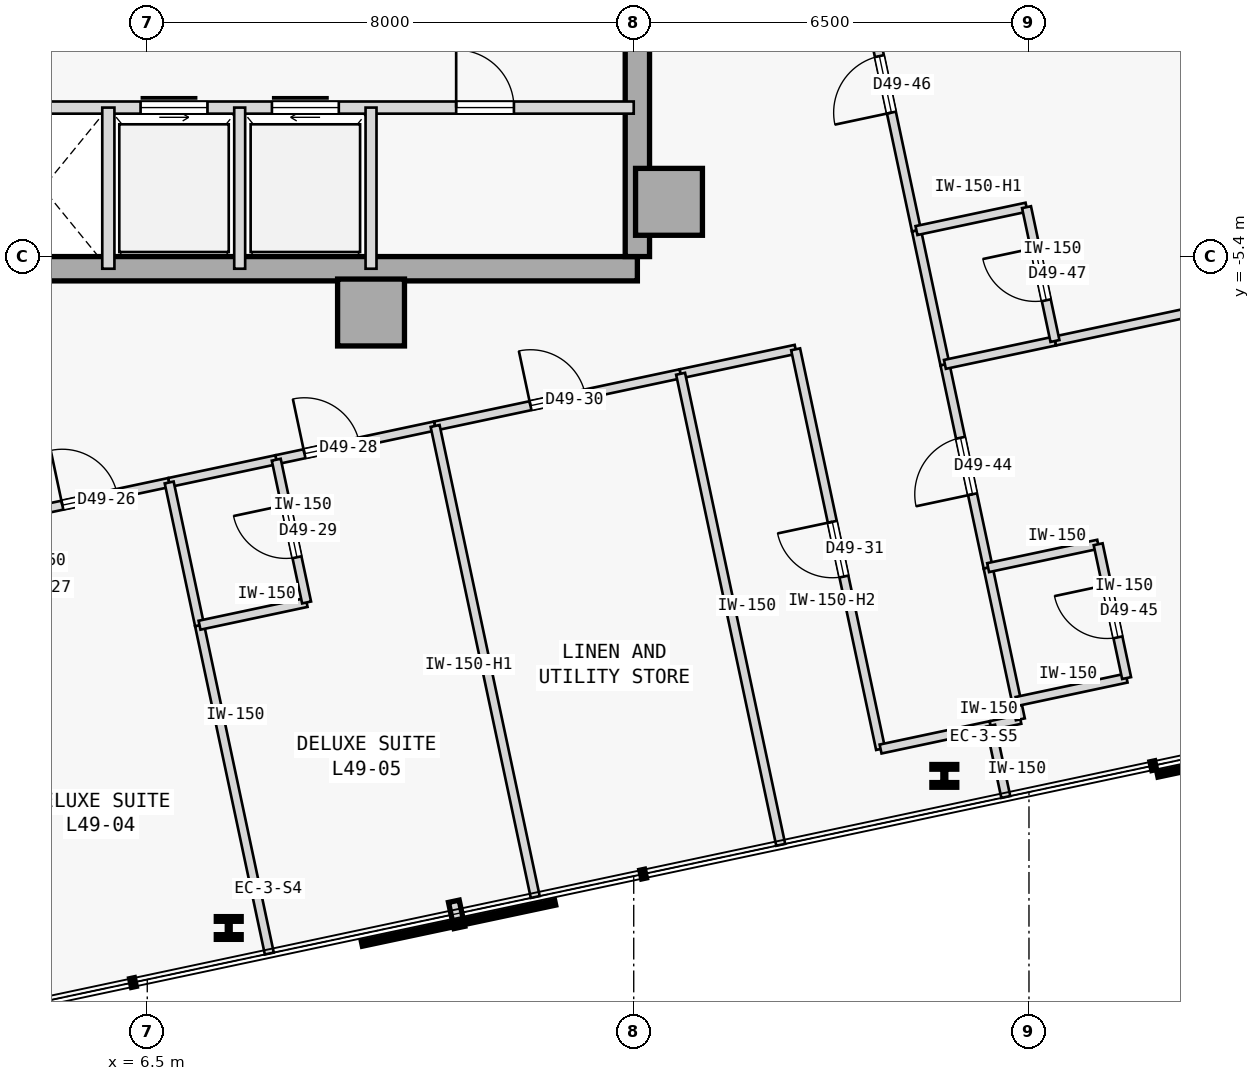
"""IFC4 building model, lengths in metres.
Left out: names, types, materials, properties, quantities, classifications, styles, units other than length and angle.
Written with IfcOpenShell. Run it as: python <this file> out.ifc"""

import sys

from ifc_helpers import new_model, si_unit, direction, frame, frame_2d, origin, origin_2d, place, context, subcontext, project, spatial, rectangle, i_section, extrude, element, fill, save


model = new_model("IFC4")
c1 = context("Model", 3, precision=1e-05, world=origin(), true_north=direction((0.0, 1.0)))
c2 = subcontext(c1, "Body", "Model", "MODEL_VIEW")
j1 = project(units=[si_unit("LENGTHUNIT", "METRE"), si_unit("PLANEANGLEUNIT", "RADIAN")], contexts=[c1])
p1 = place(None, origin())
s1 = spatial("IfcSite", under=j1, at=p1, CompositionType="ELEMENT")
p2 = place(p1, origin())
s2 = spatial("IfcBuilding", under=s1, at=p2, CompositionType="ELEMENT")
p3 = place(p2, frame((0.0, 0.0, 188.8)))
s3 = spatial("IfcBuildingStorey", under=s2, at=p3, CompositionType="ELEMENT", Elevation=188.8)
for number, where, z_axis, x_axis in (
    (1, (15.08, -4.5, 0.0), (0.0, 0.0, 1.0), (1.0, 0.0, 0.0)),
    (2, (10.18, -6.32, 0.0), (0.0, 0.0, 1.0), (1.0, 0.0, 0.0)),
):
    element("IfcColumn", number, at=place(p3, frame(where, z_axis=z_axis, x_axis=x_axis)), inside=s3, PredefinedType="COLUMN", context=c2, shape_type="SweptSolid", body=[
        extrude(rectangle(XDim=1.1, YDim=1.1, at=origin_2d()), origin(), (0.0, 0.0, 1.0), 3.4),
    ])
p4 = place(p3, frame((3.7, -5.6, 0.0), z_axis=(0.0, 0.0, 1.0), x_axis=(1.0, 0.0, 0.0)))
e3 = element("IfcWall", 3, at=p4, inside=s3, PredefinedType="SHEAR", context=c2, shape_type="SweptSolid", body=[
    extrude(rectangle(XDim=10.86, YDim=0.4, at=frame_2d((5.43, 0.0))), origin(), (0.0, 0.0, 1.0), 3.175),
])
p5 = place(p3, frame((14.56, -5.4, 0.0), z_axis=(0.0, 0.0, 1.0), x_axis=(0.0, 1.0, 0.0)))
e4 = element("IfcWall", 4, at=p5, inside=s3, PredefinedType="SHEAR", context=c2, shape_type="SweptSolid", body=[
    extrude(rectangle(XDim=10.8, YDim=0.4, at=frame_2d((5.4, 0.0))), origin(), (0.0, 0.0, 1.0), 3.175),
])
for number, where, z_axis, x_axis in (
    (5, (7.84, -16.441, 0.0), (0.0, 0.0, 1.0), (1.0, 0.0, 0.0)),
    (6, (19.608, -13.94, 0.0), (0.0, 0.0, 1.0), (1.0, 0.0, 0.0)),
):
    element("IfcColumn", number, at=place(p3, frame(where, z_axis=z_axis, x_axis=x_axis)), inside=s3, PredefinedType="COLUMN", context=c2, shape_type="SweptSolid", body=[
        extrude(i_section(OverallWidth=0.409, OverallDepth=0.374, WebThickness=0.048, FlangeThickness=0.077, FilletRadius=0.015, at=origin_2d()), origin(), (0.0, 0.0, 1.0), 3.4),
    ])
p6 = place(p3, frame((3.7, -2.95, 0.0), z_axis=(0.0, 0.0, 1.0), x_axis=(1.0, 0.0, 0.0)))
e7 = element("IfcWall", 7, at=p6, inside=s3, PredefinedType="STANDARD", context=c2, shape_type="SweptSolid", body=[
    extrude(rectangle(XDim=10.8, YDim=0.2, at=frame_2d((5.4, 0.0))), origin(), (0.0, 0.0, 1.0), 3.175),
])
p7 = place(p6, frame((2.69, 0.0, 0.0)))
e8 = element("IfcOpeningElement", 8, at=p7, cuts=e7, PredefinedType="OPENING", context=c2, shape_type="SweptSolid", body=[
    extrude(rectangle(XDim=1.1, YDim=2.15, at=frame_2d((0.55, 1.075))), frame((0.0, 0.11, 0.0), z_axis=(0.0, -1.0, 0.0), x_axis=(1.0, 0.0, 0.0)), (0.0, 0.0, 1.0), 0.22),
])
p8 = place(p6, frame((4.85, 0.0, 0.0)))
e9 = element("IfcOpeningElement", 9, at=p8, cuts=e7, PredefinedType="OPENING", context=c2, shape_type="SweptSolid", body=[
    extrude(rectangle(XDim=1.1, YDim=2.15, at=frame_2d((0.55, 1.075))), frame((0.0, 0.11, 0.0), z_axis=(0.0, -1.0, 0.0), x_axis=(1.0, 0.0, 0.0)), (0.0, 0.0, 1.0), 0.22),
])
p9 = place(p6, frame((7.88, 0.0, 0.0)))
e10 = element("IfcOpeningElement", 10, at=p9, cuts=e7, PredefinedType="OPENING", context=c2, shape_type="SweptSolid", body=[
    extrude(rectangle(XDim=0.95, YDim=2.15, at=frame_2d((0.475, 1.075))), frame((0.0, 0.11, 0.0), z_axis=(0.0, -1.0, 0.0), x_axis=(1.0, 0.0, 0.0)), (0.0, 0.0, 1.0), 0.22),
])
p10 = place(p3, frame((5.86, -5.6, 0.0), z_axis=(0.0, 0.0, 1.0), x_axis=(0.0, 1.0, 0.0)))
e11 = element("IfcWall", 11, at=p10, inside=s3, PredefinedType="STANDARD", context=c2, shape_type="SweptSolid", body=[
    extrude(rectangle(XDim=2.65, YDim=0.2, at=frame_2d((1.325, 0.0))), origin(), (0.0, 0.0, 1.0), 3.175),
])
for number, where, z_axis, x_axis in (
    (12, (10.18, -5.6, 0.0), (0.0, 0.0, 1.0), (0.0, 1.0, 0.0)),
    (13, (8.02, -5.6, 0.0), (0.0, 0.0, 1.0), (0.0, 1.0, 0.0)),
):
    element("IfcWall", number, at=place(p3, frame(where, z_axis=z_axis, x_axis=x_axis)), inside=s3, PredefinedType="STANDARD", context=c2, shape_type="SweptSolid", body=[
        extrude(rectangle(XDim=2.65, YDim=0.18, at=frame_2d((1.325, 0.0))), origin(), (0.0, 0.0, 1.0), 3.175),
    ])
p11 = place(p3, frame((4.247, -9.67, 0.0), z_axis=(0.0, 0.0, 1.0), x_axis=(0.978155367406, 0.207875148141, 0.0)))
e14 = element("IfcWall", 14, at=p11, inside=s3, PredefinedType="PARTITIONING", context=c2, shape_type="SweptSolid", body=[
    extrude(rectangle(XDim=2.672, YDim=0.15, at=frame_2d((1.336, 0.0))), origin(), (0.0, 0.0, 1.0), 3.175),
])
p12 = place(p11, frame((0.876, 0.0, 0.0)))
e15 = element("IfcOpeningElement", 15, at=p12, cuts=e14, PredefinedType="OPENING", context=c2, shape_type="SweptSolid", body=[
    extrude(rectangle(XDim=0.92, YDim=2.15, at=frame_2d((0.46, 1.075))), frame((0.0, 0.085, 0.0), z_axis=(0.0, -1.0, 0.0), x_axis=(1.0, 0.0, 0.0)), (0.0, 0.0, 1.0), 0.17),
])
p13 = place(p3, frame((8.621, -8.741, 0.0), z_axis=(0.0, 0.0, 1.0), x_axis=(0.978139565144, 0.207949491702, 0.0)))
e16 = element("IfcWall", 16, at=p13, inside=s3, PredefinedType="PARTITIONING", context=c2, shape_type="SweptSolid", body=[
    extrude(rectangle(XDim=2.671, YDim=0.15, at=frame_2d((1.335, 0.0))), origin(), (0.0, 0.0, 1.0), 3.175),
])
p14 = place(p13, frame((0.475, 0.0, 0.0)))
e17 = element("IfcOpeningElement", 17, at=p14, cuts=e16, PredefinedType="OPENING", context=c2, shape_type="SweptSolid", body=[
    extrude(rectangle(XDim=0.92, YDim=2.15, at=frame_2d((0.46, 1.075))), frame((0.0, 0.085, 0.0), z_axis=(0.0, -1.0, 0.0), x_axis=(1.0, 0.0, 0.0)), (0.0, 0.0, 1.0), 0.17),
])
p15 = place(p3, frame((6.861, -9.115, 0.0), z_axis=(0.0, 0.0, 1.0), x_axis=(0.978146440129, 0.207917150959, 0.0)))
e18 = element("IfcWall", 18, at=p15, inside=s3, PredefinedType="PARTITIONING", context=c2, shape_type="SweptSolid", body=[
    extrude(rectangle(XDim=1.8, YDim=0.15, at=frame_2d((0.9, 0.0))), origin(), (0.0, 0.0, 1.0), 3.175),
])
p16 = place(p3, frame((11.234, -8.185, 0.0), z_axis=(0.0, 0.0, 1.0), x_axis=(0.978155092113, 0.207876443525, 0.0)))
e19 = element("IfcWall", 19, at=p16, inside=s3, PredefinedType="PARTITIONING", context=c2, shape_type="SweptSolid", body=[
    extrude(rectangle(XDim=4.127, YDim=0.15, at=frame_2d((2.063, 0.0))), origin(), (0.0, 0.0, 1.0), 3.175),
])
p17 = place(p16, frame((1.604, 0.0, 0.0)))
e20 = element("IfcOpeningElement", 20, at=p17, cuts=e19, PredefinedType="OPENING", context=c2, shape_type="SweptSolid", body=[
    extrude(rectangle(XDim=0.92, YDim=2.15, at=frame_2d((0.46, 1.075))), frame((0.0, 0.085, 0.0), z_axis=(0.0, -1.0, 0.0), x_axis=(1.0, 0.0, 0.0)), (0.0, 0.0, 1.0), 0.17),
])
p18 = place(p3, frame((15.271, -7.327, 0.0), z_axis=(0.0, 0.0, 1.0), x_axis=(0.978150188204, 0.207899517354, 0.0)))
e21 = element("IfcWall", 21, at=p18, inside=s3, PredefinedType="PARTITIONING", context=c2, shape_type="SweptSolid", body=[
    extrude(rectangle(XDim=1.934, YDim=0.15, at=frame_2d((0.967, 0.0))), origin(), (0.0, 0.0, 1.0), 3.175),
])
p19 = place(p3, frame((18.56, -13.498, 0.0), z_axis=(0.0, 0.0, 1.0), x_axis=(-0.207888737749, 0.978152479278, 0.0)))
e22 = element("IfcWall", 22, at=p19, inside=s3, PredefinedType="PARTITIONING", context=c2, shape_type="SweptSolid", body=[
    extrude(rectangle(XDim=6.72, YDim=0.15, at=frame_2d((3.36, 0.0))), origin(), (0.0, 0.0, 1.0), 2.575),
])
p20 = place(p19, frame((2.9, 0.0, 0.0)))
e23 = element("IfcOpeningElement", 23, at=p20, cuts=e22, PredefinedType="OPENING", context=c2, shape_type="SweptSolid", body=[
    extrude(rectangle(XDim=0.92, YDim=2.15, at=frame_2d((0.46, 1.075))), frame((0.0, 0.085, 0.0), z_axis=(0.0, -1.0, 0.0), x_axis=(1.0, 0.0, 0.0)), (0.0, 0.0, 1.0), 0.17),
])
p21 = place(p3, frame((18.56, -13.498, 0.0), z_axis=(0.0, 0.0, 1.0), x_axis=(0.978160192495, 0.207852442415, 0.0)))
e24 = element("IfcWall", 24, at=p21, inside=s3, PredefinedType="PARTITIONING", context=c2, shape_type="SweptSolid", body=[
    extrude(rectangle(XDim=1.85, YDim=0.15, at=frame_2d((0.925, 0.0))), origin(), (0.0, 0.0, 1.0), 3.175),
])
p22 = place(p3, frame((20.369, -13.114, 0.0), z_axis=(0.0, 0.0, 1.0), x_axis=(0.978143962546, 0.207928806409, 0.0)))
e25 = element("IfcWall", 25, at=p22, inside=s3, PredefinedType="PARTITIONING", context=c2, shape_type="SweptSolid", body=[
    extrude(rectangle(XDim=0.5, YDim=0.15, at=frame_2d((0.25, 0.0))), origin(), (0.0, 0.0, 1.0), 3.175),
])
p23 = place(p3, frame((20.858, -13.01, 0.0), z_axis=(0.0, 0.0, 1.0), x_axis=(-0.208306395052, 0.978063620518, 0.0)))
e26 = element("IfcWall", 26, at=p23, inside=s3, PredefinedType="PARTITIONING", context=c2, shape_type="SweptSolid", body=[
    extrude(rectangle(XDim=0.3, YDim=0.15, at=frame_2d((0.15, 0.0))), origin(), (0.0, 0.0, 1.0), 3.175),
])
p24 = place(p3, frame((20.328, -10.515, 0.0), z_axis=(0.0, 0.0, 1.0), x_axis=(-0.207918572776, 0.978146137903, 0.0)))
e27 = element("IfcWall", 27, at=p24, inside=s3, PredefinedType="PARTITIONING", context=c2, shape_type="SweptSolid", body=[
    extrude(rectangle(XDim=3.417, YDim=0.15, at=frame_2d((1.708, 0.0))), origin(), (0.0, 0.0, 1.0), 3.175),
])
p25 = place(p24, frame((1.233, 0.0, 0.0)))
e28 = element("IfcOpeningElement", 28, at=p25, cuts=e27, PredefinedType="OPENING", context=c2, shape_type="SweptSolid", body=[
    extrude(rectangle(XDim=0.95, YDim=2.15, at=frame_2d((0.475, 1.075))), frame((0.0, 0.085, 0.0), z_axis=(0.0, -1.0, 0.0), x_axis=(1.0, 0.0, 0.0)), (0.0, 0.0, 1.0), 0.17),
])
p26 = place(p3, frame((20.796, -12.716, 0.0), z_axis=(0.0, 0.0, 1.0), x_axis=(-0.207891197838, 0.978151956427, 0.0)))
e29 = element("IfcWall", 29, at=p26, inside=s3, PredefinedType="PARTITIONING", context=c2, shape_type="SweptSolid", body=[
    extrude(rectangle(XDim=2.25, YDim=0.15, at=frame_2d((1.125, 0.0))), origin(), (0.0, 0.0, 1.0), 3.175),
])
p27 = place(p3, frame((19.15, -4.972, 0.0), z_axis=(0.0, 0.0, 1.0), x_axis=(-0.207934781332, 0.978142692409, 0.0)))
e30 = element("IfcWall", 30, at=p27, inside=s3, PredefinedType="PARTITIONING", context=c2, shape_type="SweptSolid", body=[
    extrude(rectangle(XDim=4.916, YDim=0.15, at=frame_2d((2.458, 0.0))), origin(), (0.0, 0.0, 1.0), 3.175),
])
p28 = place(p27, frame((1.983, 0.0, 0.0)))
e31 = element("IfcOpeningElement", 31, at=p28, cuts=e30, PredefinedType="OPENING", context=c2, shape_type="SweptSolid", body=[
    extrude(rectangle(XDim=0.95, YDim=2.15, at=frame_2d((0.475, 1.075))), frame((0.0, 0.085, 0.0), z_axis=(0.0, -1.0, 0.0), x_axis=(1.0, 0.0, 0.0)), (0.0, 0.0, 1.0), 0.17),
])
p29 = place(p3, frame((19.618, -7.173, 0.0), z_axis=(0.0, 0.0, 1.0), x_axis=(-0.207913264065, 0.978147266328, 0.0)))
e32 = element("IfcWall", 32, at=p29, inside=s3, PredefinedType="PARTITIONING", context=c2, shape_type="SweptSolid", body=[
    extrude(rectangle(XDim=2.25, YDim=0.15, at=frame_2d((1.125, 0.0))), origin(), (0.0, 0.0, 1.0), 3.175),
])
p30 = place(p3, frame((8.507, -16.862, 0.0), z_axis=(0.0, 0.0, 1.0), x_axis=(-0.20791588359, 0.978146709523, 0.0)))
e33 = element("IfcWall", 33, at=p30, inside=s3, PredefinedType="PARTITIONING", context=c2, shape_type="SweptSolid", body=[
    extrude(rectangle(XDim=5.52, YDim=0.15, at=frame_2d((2.76, 0.0))), origin(), (0.0, 0.0, 1.0), 3.175),
])
p31 = place(p3, frame((7.36, -11.462, 0.0), z_axis=(0.0, 0.0, 1.0), x_axis=(-0.207937840262, 0.978142042133, 0.0)))
e34 = element("IfcWall", 34, at=p31, inside=s3, PredefinedType="PARTITIONING", context=c2, shape_type="SweptSolid", body=[
    extrude(rectangle(XDim=2.4, YDim=0.15, at=frame_2d((1.2, 0.0))), origin(), (0.0, 0.0, 1.0), 3.175),
])
p32 = place(p3, frame((7.36, -11.462, 0.0), z_axis=(0.0, 0.0, 1.0), x_axis=(0.978174015353, 0.207787380965, 0.0)))
e35 = element("IfcWall", 35, at=p32, inside=s3, PredefinedType="PARTITIONING", context=c2, shape_type="SweptSolid", body=[
    extrude(rectangle(XDim=1.8, YDim=0.15, at=frame_2d((0.9, 0.0))), origin(), (0.0, 0.0, 1.0), 3.175),
])
p33 = place(p3, frame((9.12, -11.088, 0.0), z_axis=(0.0, 0.0, 1.0), x_axis=(-0.207917150959, 0.978146440129, 0.0)))
e36 = element("IfcWall", 36, at=p33, inside=s3, PredefinedType="PARTITIONING", context=c2, shape_type="SweptSolid", body=[
    extrude(rectangle(XDim=2.4, YDim=0.15, at=frame_2d((1.2, 0.0))), origin(), (0.0, 0.0, 1.0), 3.175),
])
p34 = place(p33, frame((0.76, 0.0, 0.0)))
e37 = element("IfcOpeningElement", 37, at=p34, cuts=e36, PredefinedType="OPENING", context=c2, shape_type="SweptSolid", body=[
    extrude(rectangle(XDim=0.88, YDim=2.15, at=frame_2d((0.44, 1.075))), frame((0.0, 0.085, 0.0), z_axis=(0.0, -1.0, 0.0), x_axis=(1.0, 0.0, 0.0)), (0.0, 0.0, 1.0), 0.17),
])
p35 = place(p3, frame((12.881, -15.932, 0.0), z_axis=(0.0, 0.0, 1.0), x_axis=(-0.207916267651, 0.978146627887, 0.0)))
e38 = element("IfcWall", 38, at=p35, inside=s3, PredefinedType="PARTITIONING", context=c2, shape_type="SweptSolid", body=[
    extrude(rectangle(XDim=7.92, YDim=0.15, at=frame_2d((3.96, 0.0))), origin(), (0.0, 0.0, 1.0), 2.725),
])
p36 = place(p3, frame((16.917, -15.074, 0.0), z_axis=(0.0, 0.0, 1.0), x_axis=(-0.207922536845, 0.978145295277, 0.0)))
e39 = element("IfcWall", 39, at=p36, inside=s3, PredefinedType="PARTITIONING", context=c2, shape_type="SweptSolid", body=[
    extrude(rectangle(XDim=7.92, YDim=0.15, at=frame_2d((3.96, 0.0))), origin(), (0.0, 0.0, 1.0), 3.175),
])
p37 = place(p3, frame((20.619, -14.288, 0.0), z_axis=(0.0, 0.0, 1.0), x_axis=(-0.207917150959, 0.978146440129, 0.0)))
e40 = element("IfcWall", 40, at=p37, inside=s3, PredefinedType="PARTITIONING", context=c2, shape_type="SweptSolid", body=[
    extrude(rectangle(XDim=1.2, YDim=0.15, at=frame_2d((0.6, 0.0))), origin(), (0.0, 0.0, 1.0), 3.175),
])
for number, where, z_axis, x_axis in (
    (41, (20.796, -12.716, 0.0), (0.0, 0.0, 1.0), (0.978, 0.208, 0.0)),
    (42, (20.328, -10.515, 0.0), (0.0, 0.0, 1.0), (0.978, 0.208, 0.0)),
):
    element("IfcWall", number, at=place(p3, frame(where, z_axis=z_axis, x_axis=x_axis)), inside=s3, PredefinedType="PARTITIONING", context=c2, shape_type="SweptSolid", body=[
        extrude(rectangle(XDim=1.85, YDim=0.15, at=frame_2d((0.925, 0.0))), origin(), (0.0, 0.0, 1.0), 3.175),
    ])
p38 = place(p3, frame((22.605, -12.332, 0.0), z_axis=(0.0, 0.0, 1.0), x_axis=(-0.207891197838, 0.978151956427, 0.0)))
e43 = element("IfcWall", 43, at=p38, inside=s3, PredefinedType="PARTITIONING", context=c2, shape_type="SweptSolid", body=[
    extrude(rectangle(XDim=2.25, YDim=0.15, at=frame_2d((1.125, 0.0))), origin(), (0.0, 0.0, 1.0), 3.175),
])
p39 = place(p38, frame((0.685, 0.0, 0.0)))
e44 = element("IfcOpeningElement", 44, at=p39, cuts=e43, PredefinedType="OPENING", context=c2, shape_type="SweptSolid", body=[
    extrude(rectangle(XDim=0.88, YDim=2.15, at=frame_2d((0.44, 1.075))), frame((0.0, 0.085, 0.0), z_axis=(0.0, -1.0, 0.0), x_axis=(1.0, 0.0, 0.0)), (0.0, 0.0, 1.0), 0.17),
])
p40 = place(p3, frame((21.427, -6.789, 0.0), z_axis=(0.0, 0.0, 1.0), x_axis=(0.97814556055, 0.207921288896, 0.0)))
e45 = element("IfcWall", 45, at=p40, inside=s3, PredefinedType="PARTITIONING", context=c2, shape_type="SweptSolid", body=[
    extrude(rectangle(XDim=12.187, YDim=0.15, at=frame_2d((6.094, 0.0))), origin(), (0.0, 0.0, 1.0), 2.725),
])
p41 = place(p3, frame((19.618, -7.173, 0.0), z_axis=(0.0, 0.0, 1.0), x_axis=(0.978160192495, 0.207852442415, 0.0)))
e46 = element("IfcWall", 46, at=p41, inside=s3, PredefinedType="PARTITIONING", context=c2, shape_type="SweptSolid", body=[
    extrude(rectangle(XDim=1.85, YDim=0.15, at=frame_2d((0.925, 0.0))), origin(), (0.0, 0.0, 1.0), 3.175),
])
p42 = place(p3, frame((19.15, -4.972, 0.0), z_axis=(0.0, 0.0, 1.0), x_axis=(0.978133353907, 0.20797870558, 0.0)))
e47 = element("IfcWall", 47, at=p42, inside=s3, PredefinedType="PARTITIONING", context=c2, shape_type="SweptSolid", body=[
    extrude(rectangle(XDim=1.85, YDim=0.15, at=frame_2d((0.925, 0.0))), origin(), (0.0, 0.0, 1.0), 2.725),
])
p43 = place(p3, frame((21.427, -6.789, 0.0), z_axis=(0.0, 0.0, 1.0), x_axis=(-0.207891197838, 0.978151956427, 0.0)))
e48 = element("IfcWall", 48, at=p43, inside=s3, PredefinedType="PARTITIONING", context=c2, shape_type="SweptSolid", body=[
    extrude(rectangle(XDim=2.25, YDim=0.15, at=frame_2d((1.125, 0.0))), origin(), (0.0, 0.0, 1.0), 3.175),
])
p44 = place(p43, frame((0.685, 0.0, 0.0)))
e49 = element("IfcOpeningElement", 49, at=p44, cuts=e48, PredefinedType="OPENING", context=c2, shape_type="SweptSolid", body=[
    extrude(rectangle(XDim=0.88, YDim=2.15, at=frame_2d((0.44, 1.075))), frame((0.0, 0.085, 0.0), z_axis=(0.0, -1.0, 0.0), x_axis=(1.0, 0.0, 0.0)), (0.0, 0.0, 1.0), 0.17),
])
p45 = place(p7, origin())
e50 = element("IfcDoor", 50, at=p45, inside=s3, OperationType="SLIDING_TO_LEFT", PredefinedType="DOOR", context=c2, shape_type="SweptSolid", body=[
    extrude(rectangle(XDim=1.1, YDim=2.15, at=frame_2d((0.55, 1.075))), frame((0.0, 0.025, 0.0), z_axis=(0.0, -1.0, 0.0), x_axis=(1.0, 0.0, 0.0)), (0.0, 0.0, 1.0), 0.05),
])
fill(e8, e50)
p46 = place(p8, origin())
e51 = element("IfcDoor", 51, at=p46, inside=s3, OperationType="SLIDING_TO_RIGHT", PredefinedType="DOOR", context=c2, shape_type="SweptSolid", body=[
    extrude(rectangle(XDim=1.1, YDim=2.15, at=frame_2d((0.55, 1.075))), frame((0.0, 0.025, 0.0), z_axis=(0.0, -1.0, 0.0), x_axis=(1.0, 0.0, 0.0)), (0.0, 0.0, 1.0), 0.05),
])
fill(e9, e51)
p47 = place(p9, origin())
e52 = element("IfcDoor", 52, at=p47, inside=s3, OperationType="SINGLE_SWING_LEFT", PredefinedType="DOOR", context=c2, shape_type="SweptSolid", body=[
    extrude(rectangle(XDim=0.95, YDim=2.15, at=frame_2d((0.475, 1.075))), frame((0.0, 0.025, 0.0), z_axis=(0.0, -1.0, 0.0), x_axis=(1.0, 0.0, 0.0)), (0.0, 0.0, 1.0), 0.05),
])
fill(e10, e52)
p48 = place(p12, origin())
e53 = element("IfcDoor", 53, at=p48, inside=s3, OperationType="SINGLE_SWING_LEFT", PredefinedType="DOOR", context=c2, shape_type="SweptSolid", body=[
    extrude(rectangle(XDim=0.92, YDim=2.15, at=frame_2d((0.46, 1.075))), frame((0.0, 0.025, 0.0), z_axis=(0.0, -1.0, 0.0), x_axis=(1.0, 0.0, 0.0)), (0.0, 0.0, 1.0), 0.05),
])
fill(e15, e53)
p49 = place(p14, origin())
e54 = element("IfcDoor", 54, at=p49, inside=s3, OperationType="SINGLE_SWING_LEFT", PredefinedType="DOOR", context=c2, shape_type="SweptSolid", body=[
    extrude(rectangle(XDim=0.92, YDim=2.15, at=frame_2d((0.46, 1.075))), frame((0.0, 0.025, 0.0), z_axis=(0.0, -1.0, 0.0), x_axis=(1.0, 0.0, 0.0)), (0.0, 0.0, 1.0), 0.05),
])
fill(e17, e54)
p50 = place(p34, origin())
e55 = element("IfcDoor", 55, at=p50, inside=s3, OperationType="SINGLE_SWING_RIGHT", PredefinedType="DOOR", context=c2, shape_type="SweptSolid", body=[
    extrude(rectangle(XDim=0.88, YDim=2.15, at=frame_2d((0.44, 1.075))), frame((0.0, 0.025, 0.0), z_axis=(0.0, -1.0, 0.0), x_axis=(1.0, 0.0, 0.0)), (0.0, 0.0, 1.0), 0.05),
])
fill(e37, e55)
p51 = place(p17, origin())
e56 = element("IfcDoor", 56, at=p51, inside=s3, OperationType="SINGLE_SWING_LEFT", PredefinedType="DOOR", context=c2, shape_type="SweptSolid", body=[
    extrude(rectangle(XDim=0.92, YDim=2.15, at=frame_2d((0.46, 1.075))), frame((0.0, 0.025, 0.0), z_axis=(0.0, -1.0, 0.0), x_axis=(1.0, 0.0, 0.0)), (0.0, 0.0, 1.0), 0.05),
])
fill(e20, e56)
p52 = place(p20, origin())
e57 = element("IfcDoor", 57, at=p52, inside=s3, OperationType="SINGLE_SWING_RIGHT", PredefinedType="DOOR", context=c2, shape_type="SweptSolid", body=[
    extrude(rectangle(XDim=0.92, YDim=2.15, at=frame_2d((0.46, 1.075))), frame((0.0, 0.025, 0.0), z_axis=(0.0, -1.0, 0.0), x_axis=(1.0, 0.0, 0.0)), (0.0, 0.0, 1.0), 0.05),
])
fill(e23, e57)
p53 = place(p25, origin())
e58 = element("IfcDoor", 58, at=p53, inside=s3, OperationType="SINGLE_SWING_LEFT", PredefinedType="DOOR", context=c2, shape_type="SweptSolid", body=[
    extrude(rectangle(XDim=0.95, YDim=2.15, at=frame_2d((0.475, 1.075))), frame((0.0, 0.025, 0.0), z_axis=(0.0, -1.0, 0.0), x_axis=(1.0, 0.0, 0.0)), (0.0, 0.0, 1.0), 0.05),
])
fill(e28, e58)
p54 = place(p39, origin())
e59 = element("IfcDoor", 59, at=p54, inside=s3, OperationType="SINGLE_SWING_RIGHT", PredefinedType="DOOR", context=c2, shape_type="SweptSolid", body=[
    extrude(rectangle(XDim=0.88, YDim=2.15, at=frame_2d((0.44, 1.075))), frame((0.0, 0.025, 0.0), z_axis=(0.0, -1.0, 0.0), x_axis=(1.0, 0.0, 0.0)), (0.0, 0.0, 1.0), 0.05),
])
fill(e44, e59)
p55 = place(p28, origin())
e60 = element("IfcDoor", 60, at=p55, inside=s3, OperationType="SINGLE_SWING_LEFT", PredefinedType="DOOR", context=c2, shape_type="SweptSolid", body=[
    extrude(rectangle(XDim=0.95, YDim=2.15, at=frame_2d((0.475, 1.075))), frame((0.0, 0.025, 0.0), z_axis=(0.0, -1.0, 0.0), x_axis=(1.0, 0.0, 0.0)), (0.0, 0.0, 1.0), 0.05),
])
fill(e31, e60)
p56 = place(p44, origin())
e61 = element("IfcDoor", 61, at=p56, inside=s3, OperationType="SINGLE_SWING_RIGHT", PredefinedType="DOOR", context=c2, shape_type="SweptSolid", body=[
    extrude(rectangle(XDim=0.88, YDim=2.15, at=frame_2d((0.44, 1.075))), frame((0.0, 0.025, 0.0), z_axis=(0.0, -1.0, 0.0), x_axis=(1.0, 0.0, 0.0)), (0.0, 0.0, 1.0), 0.05),
])
fill(e49, e61)
save(model, sys.argv[1])
